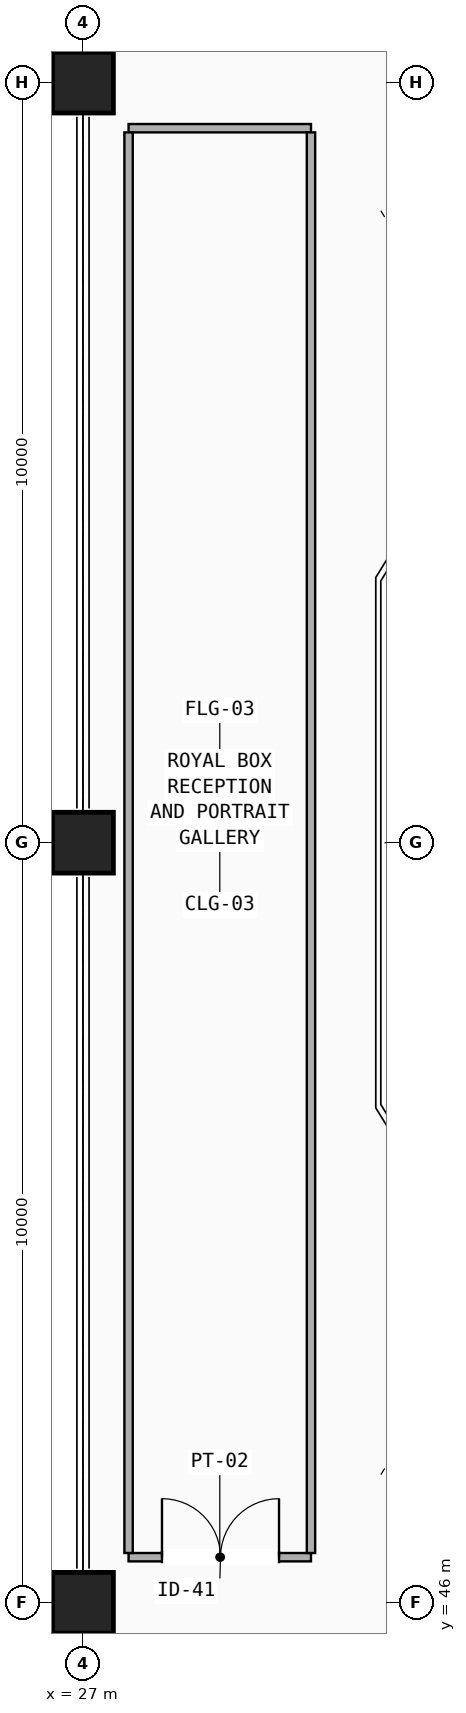
"""IFC4 building model, lengths in metres.
Left out: names, types, materials, properties, quantities, classifications, styles, units other than length and angle.
Written with IfcOpenShell. Run it as: python <this file> out.ifc"""

import sys

from ifc_helpers import new_model, si_unit, direction, frame, frame_2d, origin, origin_2d, place, context, subcontext, project, spatial, rectangle, extrude, element, fill, save


model = new_model("IFC4")
c1 = context("Model", 3, precision=1e-05, world=origin(), true_north=direction((0.0, 1.0)))
c2 = subcontext(c1, "Body", "Model", "MODEL_VIEW")
j1 = project(units=[si_unit("LENGTHUNIT", "METRE"), si_unit("PLANEANGLEUNIT", "RADIAN")], contexts=[c1])
p1 = place(None, origin())
s1 = spatial("IfcSite", under=j1, at=p1, CompositionType="ELEMENT")
p2 = place(p1, origin())
s2 = spatial("IfcBuilding", under=s1, at=p2, CompositionType="ELEMENT")
p3 = place(p2, frame((0.0, 0.0, 5.1)))
s3 = spatial("IfcBuildingStorey", under=s2, at=p3, CompositionType="ELEMENT", Elevation=5.1)
for number, where, z_axis, x_axis in (
    (1, (27.0, 46.0, 0.0), (0.0, 0.0, 1.0), (1.0, 0.0, 0.0)),
    (2, (27.0, 56.0, 0.0), (0.0, 0.0, 1.0), (1.0, 0.0, 0.0)),
    (3, (27.0, 66.0, 0.0), (0.0, 0.0, 1.0), (1.0, 0.0, 0.0)),
):
    element("IfcColumn", number, at=place(p3, frame(where, z_axis=z_axis, x_axis=x_axis)), inside=s3, PredefinedType="COLUMN", context=c2, shape_type="SweptSolid", body=[
        extrude(rectangle(XDim=0.8, YDim=0.8, at=origin_2d()), origin(), (0.0, 0.0, 1.0), 4.42),
    ])
p4 = place(p3, frame((27.6, 46.6, 0.0), z_axis=(0.0, 0.0, 1.0), x_axis=(1.0, 0.0, 0.0)))
e4 = element("IfcWall", 4, at=p4, inside=s3, PredefinedType="PARTITIONING", context=c2, shape_type="SweptSolid", body=[
    extrude(rectangle(XDim=2.4, YDim=0.11, at=frame_2d((1.2, 0.0))), origin(), (0.0, 0.0, 1.0), 4.16),
])
p5 = place(p4, frame((0.439, 0.0, 0.0)))
e5 = element("IfcOpeningElement", 5, at=p5, cuts=e4, PredefinedType="OPENING", context=c2, shape_type="SweptSolid", body=[
    extrude(rectangle(XDim=1.54, YDim=2.14, at=frame_2d((0.77, 1.07))), frame((0.0, 0.065, 0.0), z_axis=(0.0, -1.0, 0.0), x_axis=(1.0, 0.0, 0.0)), (0.0, 0.0, 1.0), 0.13),
])
p6 = place(p3, frame((27.6, 65.4, 0.0), z_axis=(0.0, 0.0, 1.0), x_axis=(1.0, 0.0, 0.0)))
e6 = element("IfcWall", 6, at=p6, inside=s3, PredefinedType="PARTITIONING", context=c2, shape_type="SweptSolid", body=[
    extrude(rectangle(XDim=2.4, YDim=0.11, at=frame_2d((1.2, 0.0))), origin(), (0.0, 0.0, 1.0), 4.16),
])
for number, where, z_axis, x_axis in (
    (7, (27.6, 46.655, 0.0), (0.0, 0.0, 1.0), (0.0, 1.0, 0.0)),
    (8, (30.0, 46.655, 0.0), (0.0, 0.0, 1.0), (0.0, 1.0, 0.0)),
):
    element("IfcWall", number, at=place(p3, frame(where, z_axis=z_axis, x_axis=x_axis)), inside=s3, PredefinedType="PARTITIONING", context=c2, shape_type="SweptSolid", body=[
        extrude(rectangle(XDim=18.69, YDim=0.11, at=frame_2d((9.345, 0.0))), origin(), (0.0, 0.0, 1.0), 3.034),
    ])
p7 = place(p5, origin())
e9 = element("IfcDoor", 9, at=p7, inside=s3, OperationType="DOUBLE_DOOR_SINGLE_SWING", PredefinedType="DOOR", context=c2, shape_type="SweptSolid", body=[
    extrude(rectangle(XDim=1.54, YDim=2.14, at=frame_2d((0.77, 1.07))), frame((0.0, 0.025, 0.0), z_axis=(0.0, -1.0, 0.0), x_axis=(1.0, 0.0, 0.0)), (0.0, 0.0, 1.0), 0.05),
])
fill(e5, e9)
save(model, sys.argv[1])
